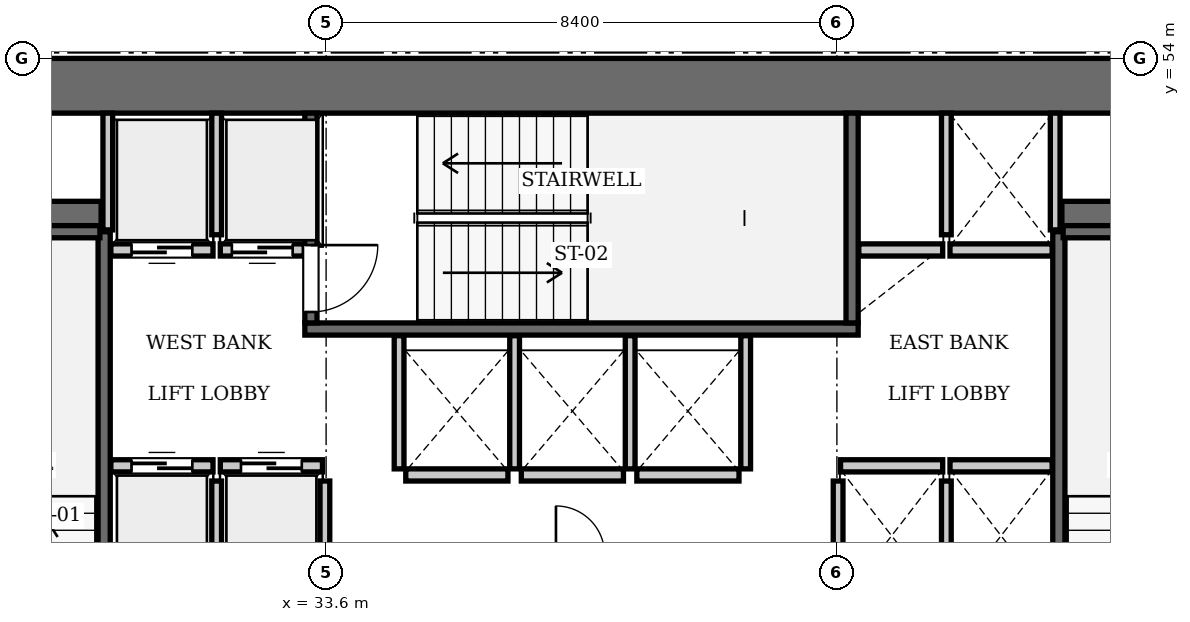
"""IFC4 building model, lengths in metres.
Left out: names, types, materials, properties, quantities, classifications, styles, units other than length and angle.
Written with IfcOpenShell. Run it as: python <this file> out.ifc"""

import sys

from ifc_helpers import new_model, si_unit, direction, frame, frame_2d, origin, place, context, subcontext, project, spatial, rectangle, extrude, element, fill, save


model = new_model("IFC4")
c1 = context("Model", 3, precision=1e-05, world=origin(), true_north=direction((0.0, 1.0)))
c2 = subcontext(c1, "Body", "Model", "MODEL_VIEW")
j1 = project(units=[si_unit("LENGTHUNIT", "METRE"), si_unit("PLANEANGLEUNIT", "RADIAN")], contexts=[c1])
p1 = place(None, origin())
s1 = spatial("IfcSite", under=j1, at=p1, CompositionType="ELEMENT")
p2 = place(p1, origin())
s2 = spatial("IfcBuilding", under=s1, at=p2, CompositionType="ELEMENT")
p3 = place(p2, frame((0.0, 0.0, 30.8)))
s3 = spatial("IfcBuildingStorey", under=s2, at=p3, CompositionType="ELEMENT", Elevation=30.8)
p4 = place(p3, frame((25.2, 53.55, 0.0), z_axis=(0.0, 0.0, 1.0), x_axis=(1.0, 0.0, 0.0)))
e1 = element("IfcWall", 1, at=p4, inside=s3, PredefinedType="SHEAR", context=c2, shape_type="SweptSolid", body=[
    extrude(rectangle(XDim=25.2, YDim=0.9, at=frame_2d((12.6, 0.0))), origin(), (0.0, 0.0, 1.0), 3.85),
])
p5 = place(p3, frame((26.1, 51.4, 0.0), z_axis=(0.0, 0.0, 1.0), x_axis=(1.0, 0.0, 0.0)))
e2 = element("IfcWall", 2, at=p5, inside=s3, PredefinedType="SHEAR", context=c2, shape_type="SweptSolid", body=[
    extrude(rectangle(XDim=3.8, YDim=0.5, at=frame_2d((1.9, 0.0))), origin(), (0.0, 0.0, 1.0), 3.85),
])
p6 = place(p3, frame((45.7, 51.4, 0.0), z_axis=(0.0, 0.0, 1.0), x_axis=(1.0, 0.0, 0.0)))
e3 = element("IfcWall", 3, at=p6, inside=s3, PredefinedType="SHEAR", context=c2, shape_type="SweptSolid", body=[
    extrude(rectangle(XDim=3.8, YDim=0.5, at=frame_2d((1.9, 0.0))), origin(), (0.0, 0.0, 1.0), 3.85),
])
p7 = place(p3, frame((29.95, 42.3, 0.0), z_axis=(0.0, 0.0, 1.0), x_axis=(0.0, 1.0, 0.0)))
e4 = element("IfcWall", 4, at=p7, inside=s3, PredefinedType="SOLIDWALL", context=c2, shape_type="SweptSolid", body=[
    extrude(rectangle(XDim=8.85, YDim=0.2, at=frame_2d((4.425, 0.0))), origin(), (0.0, 0.0, 1.0), 3.61),
])
p8 = place(p3, frame((26.38, 51.15, 0.0), z_axis=(0.0, 0.0, 1.0), x_axis=(1.0, 0.0, 0.0)))
e5 = element("IfcWall", 5, at=p8, inside=s3, PredefinedType="SOLIDWALL", context=c2, shape_type="SweptSolid", body=[
    extrude(rectangle(XDim=3.5, YDim=0.2, at=frame_2d((1.75, 0.0))), origin(), (0.0, 0.0, 1.0), 3.61),
])
p9 = place(p3, frame((33.25, 49.55, 0.0), z_axis=(0.0, 0.0, 1.0), x_axis=(1.0, 0.0, 0.0)))
e6 = element("IfcWall", 6, at=p9, inside=s3, PredefinedType="SOLIDWALL", context=c2, shape_type="SweptSolid", body=[
    extrude(rectangle(XDim=9.1, YDim=0.2, at=frame_2d((4.55, 0.0))), origin(), (0.0, 0.0, 1.0), 3.61),
])
p10 = place(p3, frame((42.25, 49.65, 0.0), z_axis=(0.0, 0.0, 1.0), x_axis=(0.0, 1.0, 0.0)))
e7 = element("IfcWall", 7, at=p10, inside=s3, PredefinedType="SOLIDWALL", context=c2, shape_type="SweptSolid", body=[
    extrude(rectangle(XDim=3.45, YDim=0.2, at=frame_2d((1.725, 0.0))), origin(), (0.0, 0.0, 1.0), 3.61),
])
p11 = place(p3, frame((33.35, 49.65, 0.0), z_axis=(0.0, 0.0, 1.0), x_axis=(0.0, 1.0, 0.0)))
e8 = element("IfcWall", 8, at=p11, inside=s3, PredefinedType="SOLIDWALL", context=c2, shape_type="SweptSolid", body=[
    extrude(rectangle(XDim=3.45, YDim=0.2, at=frame_2d((1.725, 0.0))), origin(), (0.0, 0.0, 1.0), 3.61),
])
p12 = place(p11, frame((0.18, 0.0, 0.0)))
e9 = element("IfcOpeningElement", 9, at=p12, cuts=e8, PredefinedType="OPENING", context=c2, shape_type="SweptSolid", body=[
    extrude(rectangle(XDim=1.1, YDim=2.15, at=frame_2d((0.55, 1.075))), frame((0.0, 0.11, 0.0), z_axis=(0.0, -1.0, 0.0), x_axis=(1.0, 0.0, 0.0)), (0.0, 0.0, 1.0), 0.22),
])
p13 = place(p3, frame((45.65, 42.3, 0.0), z_axis=(0.0, 0.0, 1.0), x_axis=(0.0, 1.0, 0.0)))
e10 = element("IfcWall", 10, at=p13, inside=s3, PredefinedType="SOLIDWALL", context=c2, shape_type="SweptSolid", body=[
    extrude(rectangle(XDim=8.85, YDim=0.2, at=frame_2d((4.425, 0.0))), origin(), (0.0, 0.0, 1.0), 3.61),
])
p14 = place(p3, frame((45.72, 51.15, 0.0), z_axis=(0.0, 0.0, 1.0), x_axis=(1.0, 0.0, 0.0)))
e11 = element("IfcWall", 11, at=p14, inside=s3, PredefinedType="SOLIDWALL", context=c2, shape_type="SweptSolid", body=[
    extrude(rectangle(XDim=3.5, YDim=0.2, at=frame_2d((1.75, 0.0))), origin(), (0.0, 0.0, 1.0), 3.61),
])
p15 = place(p3, frame((30.06, 47.3, 0.0), z_axis=(0.0, 0.0, 1.0), x_axis=(1.0, 0.0, 0.0)))
e12 = element("IfcWall", 12, at=p15, inside=s3, PredefinedType="SOLIDWALL", context=c2, shape_type="SweptSolid", body=[
    extrude(rectangle(XDim=1.68, YDim=0.2, at=frame_2d((0.84, 0.0))), origin(), (0.0, 0.0, 1.0), 3.61),
])
p16 = place(p15, frame((0.34, 0.0, 0.0)))
e13 = element("IfcOpeningElement", 13, at=p16, cuts=e12, PredefinedType="OPENING", context=c2, shape_type="SweptSolid", body=[
    extrude(rectangle(XDim=1.0, YDim=2.15, at=frame_2d((0.5, 1.075))), frame((0.0, 0.11, 0.0), z_axis=(0.0, -1.0, 0.0), x_axis=(1.0, 0.0, 0.0)), (0.0, 0.0, 1.0), 0.22),
])
p17 = place(p3, frame((31.86, 47.3, 0.0), z_axis=(0.0, 0.0, 1.0), x_axis=(1.0, 0.0, 0.0)))
e14 = element("IfcWall", 14, at=p17, inside=s3, PredefinedType="SOLIDWALL", context=c2, shape_type="SweptSolid", body=[
    extrude(rectangle(XDim=1.68, YDim=0.2, at=frame_2d((0.84, 0.0))), origin(), (0.0, 0.0, 1.0), 3.61),
])
p18 = place(p17, frame((0.34, 0.0, 0.0)))
e15 = element("IfcOpeningElement", 15, at=p18, cuts=e14, PredefinedType="OPENING", context=c2, shape_type="SweptSolid", body=[
    extrude(rectangle(XDim=1.0, YDim=2.15, at=frame_2d((0.5, 1.075))), frame((0.0, 0.11, 0.0), z_axis=(0.0, -1.0, 0.0), x_axis=(1.0, 0.0, 0.0)), (0.0, 0.0, 1.0), 0.22),
])
p19 = place(p3, frame((30.06, 50.85, 0.0), z_axis=(0.0, 0.0, 1.0), x_axis=(1.0, 0.0, 0.0)))
e16 = element("IfcWall", 16, at=p19, inside=s3, PredefinedType="SOLIDWALL", context=c2, shape_type="SweptSolid", body=[
    extrude(rectangle(XDim=1.68, YDim=0.2, at=frame_2d((0.84, 0.0))), origin(), (0.0, 0.0, 1.0), 3.61),
])
p20 = place(p19, frame((0.34, 0.0, 0.0)))
e17 = element("IfcOpeningElement", 17, at=p20, cuts=e16, PredefinedType="OPENING", context=c2, shape_type="SweptSolid", body=[
    extrude(rectangle(XDim=1.0, YDim=2.15, at=frame_2d((0.5, 1.075))), frame((0.0, 0.11, 0.0), z_axis=(0.0, -1.0, 0.0), x_axis=(1.0, 0.0, 0.0)), (0.0, 0.0, 1.0), 0.22),
])
p21 = place(p3, frame((31.86, 50.85, 0.0), z_axis=(0.0, 0.0, 1.0), x_axis=(1.0, 0.0, 0.0)))
e18 = element("IfcWall", 18, at=p21, inside=s3, PredefinedType="SOLIDWALL", context=c2, shape_type="SweptSolid", body=[
    extrude(rectangle(XDim=1.38, YDim=0.2, at=frame_2d((0.69, 0.0))), origin(), (0.0, 0.0, 1.0), 3.61),
])
p22 = place(p21, frame((0.19, 0.0, 0.0)))
e19 = element("IfcOpeningElement", 19, at=p22, cuts=e18, PredefinedType="OPENING", context=c2, shape_type="SweptSolid", body=[
    extrude(rectangle(XDim=1.0, YDim=2.15, at=frame_2d((0.5, 1.075))), frame((0.0, 0.11, 0.0), z_axis=(0.0, -1.0, 0.0), x_axis=(1.0, 0.0, 0.0)), (0.0, 0.0, 1.0), 0.22),
])
for number, where, z_axis, x_axis in (
    (20, (42.06, 47.3, 0.0), (0.0, 0.0, 1.0), (1.0, 0.0, 0.0)),
    (21, (43.86, 47.3, 0.0), (0.0, 0.0, 1.0), (1.0, 0.0, 0.0)),
):
    element("IfcWall", number, at=place(p3, frame(where, z_axis=z_axis, x_axis=x_axis)), inside=s3, PredefinedType="SOLIDWALL", context=c2, shape_type="SweptSolid", body=[
        extrude(rectangle(XDim=1.68, YDim=0.2, at=frame_2d((0.84, 0.0))), origin(), (0.0, 0.0, 1.0), 3.61),
    ])
p23 = place(p3, frame((42.36, 50.85, 0.0), z_axis=(0.0, 0.0, 1.0), x_axis=(1.0, 0.0, 0.0)))
e22 = element("IfcWall", 22, at=p23, inside=s3, PredefinedType="SOLIDWALL", context=c2, shape_type="SweptSolid", body=[
    extrude(rectangle(XDim=1.38, YDim=0.2, at=frame_2d((0.69, 0.0))), origin(), (0.0, 0.0, 1.0), 3.61),
])
p24 = place(p3, frame((43.86, 50.85, 0.0), z_axis=(0.0, 0.0, 1.0), x_axis=(1.0, 0.0, 0.0)))
e23 = element("IfcWall", 23, at=p24, inside=s3, PredefinedType="SOLIDWALL", context=c2, shape_type="SweptSolid", body=[
    extrude(rectangle(XDim=1.68, YDim=0.2, at=frame_2d((0.84, 0.0))), origin(), (0.0, 0.0, 1.0), 3.61),
])
p25 = place(p3, frame((34.91, 47.15, 0.0), z_axis=(0.0, 0.0, 1.0), x_axis=(1.0, 0.0, 0.0)))
e24 = element("IfcWall", 24, at=p25, inside=s3, PredefinedType="SOLIDWALL", context=c2, shape_type="SweptSolid", body=[
    extrude(rectangle(XDim=1.68, YDim=0.2, at=frame_2d((0.84, 0.0))), origin(), (0.0, 0.0, 1.0), 3.61),
])
for number, where, z_axis, x_axis in (
    (25, (36.81, 47.15, 0.0), (0.0, 0.0, 1.0), (1.0, 0.0, 0.0)),
    (26, (38.71, 47.15, 0.0), (0.0, 0.0, 1.0), (1.0, 0.0, 0.0)),
):
    element("IfcWall", number, at=place(p3, frame(where, z_axis=z_axis, x_axis=x_axis)), inside=s3, PredefinedType="SOLIDWALL", context=c2, shape_type="SweptSolid", body=[
        extrude(rectangle(XDim=1.68, YDim=0.2, at=frame_2d((0.84, 0.0))), origin(), (0.0, 0.0, 1.0), 3.61),
    ])
for number, where, z_axis, x_axis in (
    (27, (31.8, 45.1, 0.0), (0.0, 0.0, 1.0), (0.0, 1.0, 0.0)),
    (28, (33.58, 45.1, 0.0), (0.0, 0.0, 1.0), (0.0, 1.0, 0.0)),
):
    element("IfcWall", number, at=place(p3, frame(where, z_axis=z_axis, x_axis=x_axis)), inside=s3, PredefinedType="SOLIDWALL", context=c2, shape_type="SweptSolid", body=[
        extrude(rectangle(XDim=1.95, YDim=0.16, at=frame_2d((0.975, 0.0))), origin(), (0.0, 0.0, 1.0), 3.61),
    ])
p26 = place(p3, frame((30.01, 51.18, 0.0), z_axis=(0.0, 0.0, 1.0), x_axis=(0.0, 1.0, 0.0)))
e29 = element("IfcWall", 29, at=p26, inside=s3, PredefinedType="SOLIDWALL", context=c2, shape_type="SweptSolid", body=[
    extrude(rectangle(XDim=1.92, YDim=0.16, at=frame_2d((0.96, 0.0))), origin(), (0.0, 0.0, 1.0), 3.61),
])
p27 = place(p3, frame((31.8, 51.1, 0.0), z_axis=(0.0, 0.0, 1.0), x_axis=(0.0, 1.0, 0.0)))
e30 = element("IfcWall", 30, at=p27, inside=s3, PredefinedType="SOLIDWALL", context=c2, shape_type="SweptSolid", body=[
    extrude(rectangle(XDim=2.0, YDim=0.16, at=frame_2d((1.0, 0.0))), origin(), (0.0, 0.0, 1.0), 3.61),
])
for number, where, z_axis, x_axis in (
    (31, (42.02, 45.1, 0.0), (0.0, 0.0, 1.0), (0.0, 1.0, 0.0)),
    (32, (43.8, 45.1, 0.0), (0.0, 0.0, 1.0), (0.0, 1.0, 0.0)),
):
    element("IfcWall", number, at=place(p3, frame(where, z_axis=z_axis, x_axis=x_axis)), inside=s3, PredefinedType="SOLIDWALL", context=c2, shape_type="SweptSolid", body=[
        extrude(rectangle(XDim=1.95, YDim=0.16, at=frame_2d((0.975, 0.0))), origin(), (0.0, 0.0, 1.0), 3.61),
    ])
p28 = place(p3, frame((45.59, 51.18, 0.0), z_axis=(0.0, 0.0, 1.0), x_axis=(0.0, 1.0, 0.0)))
e33 = element("IfcWall", 33, at=p28, inside=s3, PredefinedType="SOLIDWALL", context=c2, shape_type="SweptSolid", body=[
    extrude(rectangle(XDim=1.92, YDim=0.16, at=frame_2d((0.96, 0.0))), origin(), (0.0, 0.0, 1.0), 3.61),
])
p29 = place(p3, frame((43.8, 51.1, 0.0), z_axis=(0.0, 0.0, 1.0), x_axis=(0.0, 1.0, 0.0)))
e34 = element("IfcWall", 34, at=p29, inside=s3, PredefinedType="SOLIDWALL", context=c2, shape_type="SweptSolid", body=[
    extrude(rectangle(XDim=2.0, YDim=0.16, at=frame_2d((1.0, 0.0))), origin(), (0.0, 0.0, 1.0), 3.61),
])
for number, where, z_axis, x_axis in (
    (35, (34.8, 47.25, 0.0), (0.0, 0.0, 1.0), (0.0, 1.0, 0.0)),
    (36, (36.7, 47.25, 0.0), (0.0, 0.0, 1.0), (0.0, 1.0, 0.0)),
    (37, (38.6, 47.25, 0.0), (0.0, 0.0, 1.0), (0.0, 1.0, 0.0)),
    (38, (40.5, 47.25, 0.0), (0.0, 0.0, 1.0), (0.0, 1.0, 0.0)),
):
    element("IfcWall", number, at=place(p3, frame(where, z_axis=z_axis, x_axis=x_axis)), inside=s3, PredefinedType="SOLIDWALL", context=c2, shape_type="SweptSolid", body=[
        extrude(rectangle(XDim=2.19, YDim=0.16, at=frame_2d((1.095, 0.0))), origin(), (0.0, 0.0, 1.0), 3.61),
    ])
p30 = place(p12, frame((1.1, 0.0, 0.0), z_axis=(0.0, 0.0, 1.0), x_axis=(-1.0, 0.0, 0.0)))
e39 = element("IfcDoor", 39, at=p30, inside=s3, OperationType="SINGLE_SWING_LEFT", PredefinedType="DOOR", context=c2, shape_type="SweptSolid", body=[
    extrude(rectangle(XDim=1.1, YDim=2.15, at=frame_2d((0.55, 1.075))), frame((0.0, 0.025, 0.0), z_axis=(0.0, -1.0, 0.0), x_axis=(1.0, 0.0, 0.0)), (0.0, 0.0, 1.0), 0.05),
])
fill(e9, e39)
p31 = place(p16, origin())
e40 = element("IfcDoor", 40, at=p31, inside=s3, OperationType="SLIDING_TO_LEFT", PredefinedType="DOOR", context=c2, shape_type="SweptSolid", body=[
    extrude(rectangle(XDim=1.0, YDim=2.15, at=frame_2d((0.5, 1.075))), frame((0.0, 0.025, 0.0), z_axis=(0.0, -1.0, 0.0), x_axis=(1.0, 0.0, 0.0)), (0.0, 0.0, 1.0), 0.05),
])
fill(e13, e40)
p32 = place(p18, origin())
e41 = element("IfcDoor", 41, at=p32, inside=s3, OperationType="SLIDING_TO_LEFT", PredefinedType="DOOR", context=c2, shape_type="SweptSolid", body=[
    extrude(rectangle(XDim=1.0, YDim=2.15, at=frame_2d((0.5, 1.075))), frame((0.0, 0.025, 0.0), z_axis=(0.0, -1.0, 0.0), x_axis=(1.0, 0.0, 0.0)), (0.0, 0.0, 1.0), 0.05),
])
fill(e15, e41)
p33 = place(p20, frame((1.0, 0.0, 0.0), z_axis=(0.0, 0.0, 1.0), x_axis=(-1.0, 0.0, 0.0)))
e42 = element("IfcDoor", 42, at=p33, inside=s3, OperationType="SLIDING_TO_LEFT", PredefinedType="DOOR", context=c2, shape_type="SweptSolid", body=[
    extrude(rectangle(XDim=1.0, YDim=2.15, at=frame_2d((0.5, 1.075))), frame((0.0, 0.025, 0.0), z_axis=(0.0, -1.0, 0.0), x_axis=(1.0, 0.0, 0.0)), (0.0, 0.0, 1.0), 0.05),
])
fill(e17, e42)
p34 = place(p22, frame((1.0, 0.0, 0.0), z_axis=(0.0, 0.0, 1.0), x_axis=(-1.0, 0.0, 0.0)))
e43 = element("IfcDoor", 43, at=p34, inside=s3, OperationType="SLIDING_TO_LEFT", PredefinedType="DOOR", context=c2, shape_type="SweptSolid", body=[
    extrude(rectangle(XDim=1.0, YDim=2.15, at=frame_2d((0.5, 1.075))), frame((0.0, 0.025, 0.0), z_axis=(0.0, -1.0, 0.0), x_axis=(1.0, 0.0, 0.0)), (0.0, 0.0, 1.0), 0.05),
])
fill(e19, e43)
save(model, sys.argv[1])
